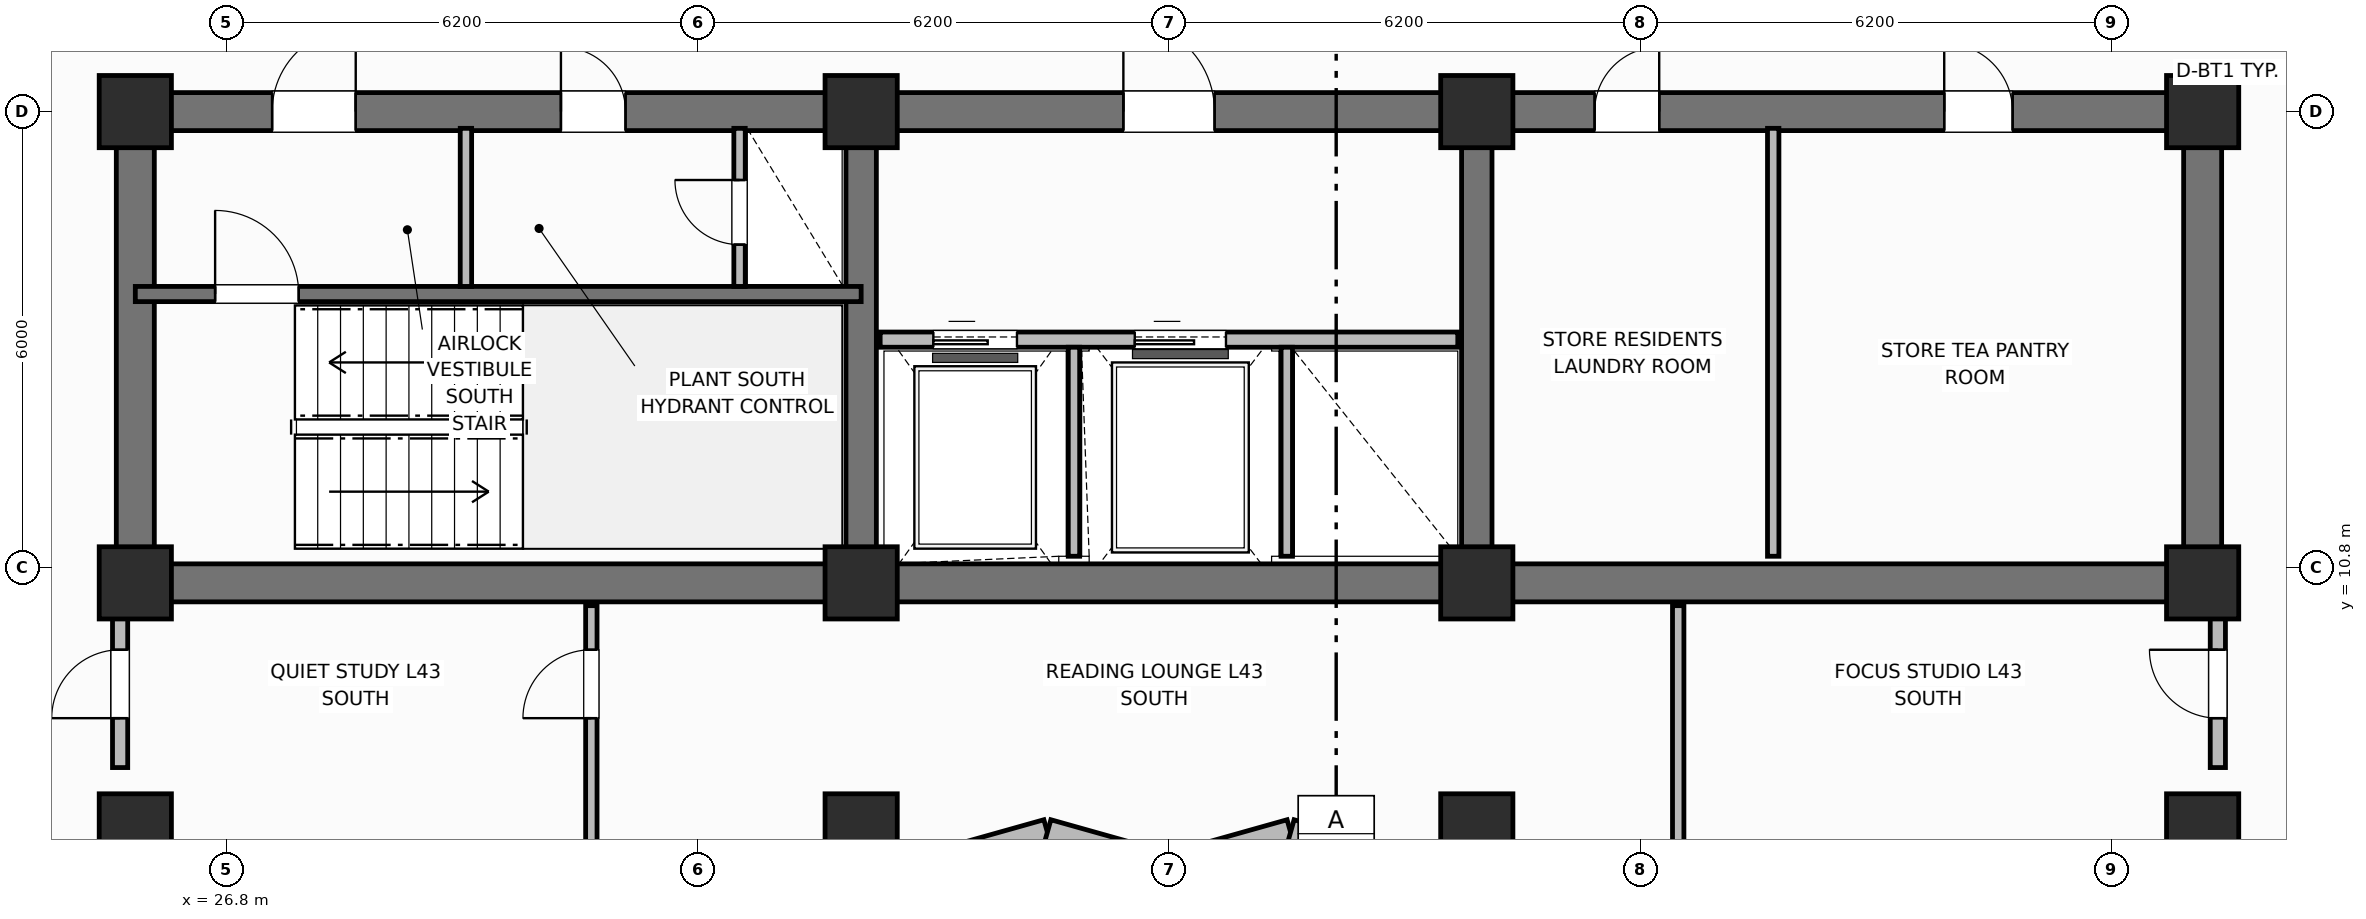
"""IFC4 building model, lengths in metres.
Left out: names, types, materials, properties, quantities, classifications, styles, units other than length and angle.
Written with IfcOpenShell. Run it as: python <this file> out.ifc"""

import sys

from ifc_helpers import new_model, si_unit, direction, frame, frame_2d, origin, origin_2d, place, context, subcontext, project, spatial, rectangle, extrude, element, fill, save


model = new_model("IFC4")
c1 = context("Model", 3, precision=1e-05, world=origin(), true_north=direction((0.0, 1.0)))
c2 = subcontext(c1, "Body", "Model", "MODEL_VIEW")
j1 = project(units=[si_unit("LENGTHUNIT", "METRE"), si_unit("PLANEANGLEUNIT", "RADIAN")], contexts=[c1])
p1 = place(None, origin())
s1 = spatial("IfcSite", under=j1, at=p1, CompositionType="ELEMENT")
p2 = place(p1, origin())
s2 = spatial("IfcBuilding", under=s1, at=p2, CompositionType="ELEMENT")
p3 = place(p2, frame((0.0, 0.0, 173.7)))
s3 = spatial("IfcBuildingStorey", under=s2, at=p3, CompositionType="ELEMENT", Elevation=173.7)
p4 = place(p3, frame((52.8, 10.6, 0.0), z_axis=(0.0, 0.0, 1.0), x_axis=(-1.0, 0.0, 0.0)))
e1 = element("IfcWall", 1, at=p4, inside=s3, PredefinedType="SHEAR", context=c2, shape_type="SweptSolid", body=[
    extrude(rectangle(XDim=27.2, YDim=0.5, at=frame_2d((13.6, 0.0))), origin(), (0.0, 0.0, 1.0), 3.7),
])
for number, where, z_axis, x_axis in (
    (2, (25.6, 10.85, 0.0), (0.0, 0.0, 1.0), (0.0, 1.0, 0.0)),
    (3, (52.8, 10.85, 0.0), (0.0, 0.0, 1.0), (0.0, 1.0, 0.0)),
):
    element("IfcWall", number, at=place(p3, frame(where, z_axis=z_axis, x_axis=x_axis)), inside=s3, PredefinedType="SHEAR", context=c2, shape_type="SweptSolid", body=[
        extrude(rectangle(XDim=5.7, YDim=0.5, at=frame_2d((2.85, 0.0))), origin(), (0.0, 0.0, 1.0), 3.7),
    ])
p5 = place(p3, frame((25.6, 16.8, 0.0), z_axis=(0.0, 0.0, 1.0), x_axis=(1.0, 0.0, 0.0)))
e4 = element("IfcWall", 4, at=p5, inside=s3, PredefinedType="SHEAR", context=c2, shape_type="SweptSolid", body=[
    extrude(rectangle(XDim=27.2, YDim=0.5, at=frame_2d((13.6, 0.0))), origin(), (0.0, 0.0, 1.0), 3.7),
])
p6 = place(p5, frame((1.8, 0.0, 0.0)))
e5 = element("IfcOpeningElement", 5, at=p6, cuts=e4, PredefinedType="OPENING", context=c2, shape_type="SweptSolid", body=[
    extrude(rectangle(XDim=1.1, YDim=2.15, at=frame_2d((0.55, 1.075))), frame((0.0, 0.26, 0.0), z_axis=(0.0, -1.0, 0.0), x_axis=(1.0, 0.0, 0.0)), (0.0, 0.0, 1.0), 0.52),
])
p7 = place(p5, frame((5.6, 0.0, 0.0)))
e6 = element("IfcOpeningElement", 6, at=p7, cuts=e4, PredefinedType="OPENING", context=c2, shape_type="SweptSolid", body=[
    extrude(rectangle(XDim=0.85, YDim=2.1, at=frame_2d((0.425, 1.05))), frame((0.0, 0.26, 0.0), z_axis=(0.0, -1.0, 0.0), x_axis=(1.0, 0.0, 0.0)), (0.0, 0.0, 1.0), 0.52),
])
p8 = place(p5, frame((13.0, 0.0, 0.0)))
e7 = element("IfcOpeningElement", 7, at=p8, cuts=e4, PredefinedType="OPENING", context=c2, shape_type="SweptSolid", body=[
    extrude(rectangle(XDim=1.2, YDim=2.15, at=frame_2d((0.6, 1.075))), frame((0.0, 0.26, 0.0), z_axis=(0.0, -1.0, 0.0), x_axis=(1.0, 0.0, 0.0)), (0.0, 0.0, 1.0), 0.52),
])
p9 = place(p5, frame((19.2, 0.0, 0.0)))
e8 = element("IfcOpeningElement", 8, at=p9, cuts=e4, PredefinedType="OPENING", context=c2, shape_type="SweptSolid", body=[
    extrude(rectangle(XDim=0.85, YDim=2.1, at=frame_2d((0.425, 1.05))), frame((0.0, 0.26, 0.0), z_axis=(0.0, -1.0, 0.0), x_axis=(1.0, 0.0, 0.0)), (0.0, 0.0, 1.0), 0.52),
])
p10 = place(p5, frame((23.8, 0.0, 0.0)))
e9 = element("IfcOpeningElement", 9, at=p10, cuts=e4, PredefinedType="OPENING", context=c2, shape_type="SweptSolid", body=[
    extrude(rectangle(XDim=0.9, YDim=2.1, at=frame_2d((0.45, 1.05))), frame((0.0, 0.26, 0.0), z_axis=(0.0, -1.0, 0.0), x_axis=(1.0, 0.0, 0.0)), (0.0, 0.0, 1.0), 0.52),
])
for number, where, z_axis, x_axis in (
    (10, (35.15, 10.85, 0.0), (0.0, 0.0, 1.0), (0.0, 1.0, 0.0)),
    (11, (43.25, 10.85, 0.0), (0.0, 0.0, 1.0), (0.0, 1.0, 0.0)),
):
    element("IfcWall", number, at=place(p3, frame(where, z_axis=z_axis, x_axis=x_axis)), inside=s3, PredefinedType="SHEAR", context=c2, shape_type="SweptSolid", body=[
        extrude(rectangle(XDim=5.7, YDim=0.4, at=frame_2d((2.85, 0.0))), origin(), (0.0, 0.0, 1.0), 3.7),
    ])
for number, where, z_axis, x_axis in (
    (12, (25.6, 10.6, 0.0), (0.0, 0.0, 1.0), (1.0, 0.0, 0.0)),
    (13, (25.6, 16.8, 0.0), (0.0, 0.0, 1.0), (1.0, 0.0, 0.0)),
    (14, (35.15, 10.6, 0.0), (0.0, 0.0, 1.0), (1.0, 0.0, 0.0)),
    (15, (35.15, 16.8, 0.0), (0.0, 0.0, 1.0), (1.0, 0.0, 0.0)),
    (16, (43.25, 10.6, 0.0), (0.0, 0.0, 1.0), (1.0, 0.0, 0.0)),
    (17, (43.25, 16.8, 0.0), (0.0, 0.0, 1.0), (1.0, 0.0, 0.0)),
    (18, (52.8, 10.6, 0.0), (0.0, 0.0, 1.0), (1.0, 0.0, 0.0)),
    (19, (52.8, 16.8, 0.0), (0.0, 0.0, 1.0), (1.0, 0.0, 0.0)),
    (20, (25.6, 7.35, 0.0), (0.0, 0.0, 1.0), (1.0, 0.0, 0.0)),
    (21, (35.15, 7.35, 0.0), (0.0, 0.0, 1.0), (1.0, 0.0, 0.0)),
    (22, (43.25, 7.35, 0.0), (0.0, 0.0, 1.0), (1.0, 0.0, 0.0)),
    (23, (52.8, 7.35, 0.0), (0.0, 0.0, 1.0), (1.0, 0.0, 0.0)),
):
    element("IfcColumn", number, at=place(p3, frame(where, z_axis=z_axis, x_axis=x_axis)), inside=s3, PredefinedType="COLUMN", context=c2, shape_type="SweptSolid", body=[
        extrude(rectangle(XDim=0.95, YDim=0.95, at=origin_2d()), origin(), (0.0, 0.0, 1.0), 3.7),
    ])
p11 = place(p3, frame((36.0, 6.87, 0.0), z_axis=(0.0, 0.0, 1.0), x_axis=(0.962662902433, 0.270703040766, 0.0)))
e24 = element("IfcWall", 24, at=p11, inside=s3, PredefinedType="SOLIDWALL", context=c2, shape_type="SweptSolid", body=[
    extrude(rectangle(XDim=1.662, YDim=0.34, at=frame_2d((0.831, 0.0))), origin(), (0.0, 0.0, 1.0), 2.72),
])
p12 = place(p3, frame((37.6, 7.32, 0.0), z_axis=(0.0, 0.0, 1.0), x_axis=(0.962652136636, -0.270741322725, 0.0)))
e25 = element("IfcWall", 25, at=p12, inside=s3, PredefinedType="SOLIDWALL", context=c2, shape_type="SweptSolid", body=[
    extrude(rectangle(XDim=1.662, YDim=0.34, at=frame_2d((0.831, 0.0))), origin(), (0.0, 0.0, 1.0), 2.72),
])
p13 = place(p3, frame((39.2, 6.87, 0.0), z_axis=(0.0, 0.0, 1.0), x_axis=(0.962662902433, 0.270703040766, 0.0)))
e26 = element("IfcWall", 26, at=p13, inside=s3, PredefinedType="SOLIDWALL", context=c2, shape_type="SweptSolid", body=[
    extrude(rectangle(XDim=1.662, YDim=0.34, at=frame_2d((0.831, 0.0))), origin(), (0.0, 0.0, 1.0), 2.72),
])
p14 = place(p3, frame((40.8, 7.32, 0.0), z_axis=(0.0, 0.0, 1.0), x_axis=(0.962652136636, -0.270741322725, 0.0)))
e27 = element("IfcWall", 27, at=p14, inside=s3, PredefinedType="SOLIDWALL", context=c2, shape_type="SweptSolid", body=[
    extrude(rectangle(XDim=1.662, YDim=0.34, at=frame_2d((0.831, 0.0))), origin(), (0.0, 0.0, 1.0), 2.72),
])
p15 = place(p3, frame((25.6, 14.4, 0.0), z_axis=(0.0, 0.0, 1.0), x_axis=(1.0, 0.0, 0.0)))
e28 = element("IfcWall", 28, at=p15, inside=s3, PredefinedType="SHEAR", context=c2, shape_type="SweptSolid", body=[
    extrude(rectangle(XDim=9.55, YDim=0.2, at=frame_2d((4.775, 0.0))), origin(), (0.0, 0.0, 1.0), 3.7),
])
p16 = place(p15, frame((1.05, 0.0, 0.0)))
e29 = element("IfcOpeningElement", 29, at=p16, cuts=e28, PredefinedType="OPENING", context=c2, shape_type="SweptSolid", body=[
    extrude(rectangle(XDim=1.1, YDim=2.15, at=frame_2d((0.55, 1.075))), frame((0.0, 0.11, 0.0), z_axis=(0.0, -1.0, 0.0), x_axis=(1.0, 0.0, 0.0)), (0.0, 0.0, 1.0), 0.22),
])
p17 = place(p3, frame((29.95, 14.5, 0.0), z_axis=(0.0, 0.0, 1.0), x_axis=(0.0, 1.0, 0.0)))
e30 = element("IfcWall", 30, at=p17, inside=s3, PredefinedType="PARTITIONING", context=c2, shape_type="SweptSolid", body=[
    extrude(rectangle(XDim=2.08, YDim=0.15, at=frame_2d((1.04, 0.0))), origin(), (0.0, 0.0, 1.0), 2.55),
])
p18 = place(p3, frame((33.55, 14.5, 0.0), z_axis=(0.0, 0.0, 1.0), x_axis=(0.0, 1.0, 0.0)))
e31 = element("IfcWall", 31, at=p18, inside=s3, PredefinedType="PARTITIONING", context=c2, shape_type="SweptSolid", body=[
    extrude(rectangle(XDim=2.08, YDim=0.15, at=frame_2d((1.04, 0.0))), origin(), (0.0, 0.0, 1.0), 2.55),
])
p19 = place(p18, frame((0.55, 0.0, 0.0)))
e32 = element("IfcOpeningElement", 32, at=p19, cuts=e31, PredefinedType="OPENING", context=c2, shape_type="SweptSolid", body=[
    extrude(rectangle(XDim=0.85, YDim=2.05, at=frame_2d((0.425, 1.025))), frame((0.0, 0.085, 0.0), z_axis=(0.0, -1.0, 0.0), x_axis=(1.0, 0.0, 0.0)), (0.0, 0.0, 1.0), 0.17),
])
p20 = place(p3, frame((35.4, 13.8, 0.0), z_axis=(0.0, 0.0, 1.0), x_axis=(1.0, 0.0, 0.0)))
e33 = element("IfcWall", 33, at=p20, inside=s3, PredefinedType="PARTITIONING", context=c2, shape_type="SweptSolid", body=[
    extrude(rectangle(XDim=7.6, YDim=0.2, at=frame_2d((3.8, 0.0))), origin(), (0.0, 0.0, 1.0), 2.32),
])
p21 = place(p20, frame((0.7, 0.0, 0.0)))
e34 = element("IfcOpeningElement", 34, at=p21, cuts=e33, PredefinedType="OPENING", context=c2, shape_type="SweptSolid", body=[
    extrude(rectangle(XDim=1.1, YDim=2.15, at=frame_2d((0.55, 1.075))), frame((0.0, 0.11, 0.0), z_axis=(0.0, -1.0, 0.0), x_axis=(1.0, 0.0, 0.0)), (0.0, 0.0, 1.0), 0.22),
])
p22 = place(p20, frame((3.35, 0.0, 0.0)))
e35 = element("IfcOpeningElement", 35, at=p22, cuts=e33, PredefinedType="OPENING", context=c2, shape_type="SweptSolid", body=[
    extrude(rectangle(XDim=1.2, YDim=2.15, at=frame_2d((0.6, 1.075))), frame((0.0, 0.11, 0.0), z_axis=(0.0, -1.0, 0.0), x_axis=(1.0, 0.0, 0.0)), (0.0, 0.0, 1.0), 0.22),
])
for number, where, z_axis, x_axis in (
    (36, (37.95, 10.95, 0.0), (0.0, 0.0, 1.0), (0.0, 1.0, 0.0)),
    (37, (40.75, 10.95, 0.0), (0.0, 0.0, 1.0), (0.0, 1.0, 0.0)),
):
    element("IfcWall", number, at=place(p3, frame(where, z_axis=z_axis, x_axis=x_axis)), inside=s3, PredefinedType="PARTITIONING", context=c2, shape_type="SweptSolid", body=[
        extrude(rectangle(XDim=2.75, YDim=0.15, at=frame_2d((1.375, 0.0))), origin(), (0.0, 0.0, 1.0), 2.55),
    ])
p23 = place(p3, frame((47.15, 10.95, 0.0), z_axis=(0.0, 0.0, 1.0), x_axis=(0.0, 1.0, 0.0)))
e38 = element("IfcWall", 38, at=p23, inside=s3, PredefinedType="PARTITIONING", context=c2, shape_type="SweptSolid", body=[
    extrude(rectangle(XDim=5.63, YDim=0.15, at=frame_2d((2.815, 0.0))), origin(), (0.0, 0.0, 1.0), 2.55),
])
p24 = place(p3, frame((31.6, 6.87, 0.0), z_axis=(0.0, 0.0, 1.0), x_axis=(0.0, 1.0, 0.0)))
e39 = element("IfcWall", 39, at=p24, inside=s3, PredefinedType="PARTITIONING", context=c2, shape_type="SweptSolid", body=[
    extrude(rectangle(XDim=3.43, YDim=0.15, at=frame_2d((1.715, 0.0))), origin(), (0.0, 0.0, 1.0), 2.55),
])
p25 = place(p24, frame((1.95, 0.0, 0.0)))
e40 = element("IfcOpeningElement", 40, at=p25, cuts=e39, PredefinedType="OPENING", context=c2, shape_type="SweptSolid", body=[
    extrude(rectangle(XDim=0.9, YDim=2.1, at=frame_2d((0.45, 1.05))), frame((0.0, 0.085, 0.0), z_axis=(0.0, -1.0, 0.0), x_axis=(1.0, 0.0, 0.0)), (0.0, 0.0, 1.0), 0.17),
])
p26 = place(p3, frame((45.9, 6.87, 0.0), z_axis=(0.0, 0.0, 1.0), x_axis=(0.0, 1.0, 0.0)))
e41 = element("IfcWall", 41, at=p26, inside=s3, PredefinedType="PARTITIONING", context=c2, shape_type="SweptSolid", body=[
    extrude(rectangle(XDim=3.43, YDim=0.15, at=frame_2d((1.715, 0.0))), origin(), (0.0, 0.0, 1.0), 2.55),
])
p27 = place(p3, frame((25.4, 8.17, 0.0), z_axis=(0.0, 0.0, 1.0), x_axis=(0.0, 1.0, 0.0)))
e42 = element("IfcWall", 42, at=p27, inside=s3, PredefinedType="PARTITIONING", context=c2, shape_type="SweptSolid", body=[
    extrude(rectangle(XDim=2.13, YDim=0.2, at=frame_2d((1.065, 0.0))), origin(), (0.0, 0.0, 1.0), 2.55),
])
p28 = place(p27, frame((0.65, 0.0, 0.0)))
e43 = element("IfcOpeningElement", 43, at=p28, cuts=e42, PredefinedType="OPENING", context=c2, shape_type="SweptSolid", body=[
    extrude(rectangle(XDim=0.9, YDim=2.1, at=frame_2d((0.45, 1.05))), frame((0.0, 0.11, 0.0), z_axis=(0.0, -1.0, 0.0), x_axis=(1.0, 0.0, 0.0)), (0.0, 0.0, 1.0), 0.22),
])
p29 = place(p3, frame((53.0, 8.17, 0.0), z_axis=(0.0, 0.0, 1.0), x_axis=(0.0, 1.0, 0.0)))
e44 = element("IfcWall", 44, at=p29, inside=s3, PredefinedType="PARTITIONING", context=c2, shape_type="SweptSolid", body=[
    extrude(rectangle(XDim=2.13, YDim=0.2, at=frame_2d((1.065, 0.0))), origin(), (0.0, 0.0, 1.0), 2.55),
])
p30 = place(p29, frame((0.65, 0.0, 0.0)))
e45 = element("IfcOpeningElement", 45, at=p30, cuts=e44, PredefinedType="OPENING", context=c2, shape_type="SweptSolid", body=[
    extrude(rectangle(XDim=0.9, YDim=2.1, at=frame_2d((0.45, 1.05))), frame((0.0, 0.11, 0.0), z_axis=(0.0, -1.0, 0.0), x_axis=(1.0, 0.0, 0.0)), (0.0, 0.0, 1.0), 0.22),
])
p31 = place(p16, origin())
e46 = element("IfcDoor", 46, at=p31, inside=s3, OperationType="SINGLE_SWING_LEFT", PredefinedType="DOOR", context=c2, shape_type="SweptSolid", body=[
    extrude(rectangle(XDim=1.1, YDim=2.15, at=frame_2d((0.55, 1.075))), frame((0.0, 0.025, 0.0), z_axis=(0.0, -1.0, 0.0), x_axis=(1.0, 0.0, 0.0)), (0.0, 0.0, 1.0), 0.05),
])
fill(e29, e46)
p32 = place(p19, origin())
e47 = element("IfcDoor", 47, at=p32, inside=s3, OperationType="SINGLE_SWING_RIGHT", PredefinedType="TRAPDOOR", context=c2, shape_type="SweptSolid", body=[
    extrude(rectangle(XDim=0.85, YDim=2.05, at=frame_2d((0.425, 1.025))), frame((0.0, 0.025, 0.0), z_axis=(0.0, -1.0, 0.0), x_axis=(1.0, 0.0, 0.0)), (0.0, 0.0, 1.0), 0.05),
])
fill(e32, e47)
p33 = place(p21, origin())
e48 = element("IfcDoor", 48, at=p33, inside=s3, OperationType="SLIDING_TO_LEFT", PredefinedType="DOOR", context=c2, shape_type="SweptSolid", body=[
    extrude(rectangle(XDim=1.1, YDim=2.15, at=frame_2d((0.55, 1.075))), frame((0.0, 0.025, 0.0), z_axis=(0.0, -1.0, 0.0), x_axis=(1.0, 0.0, 0.0)), (0.0, 0.0, 1.0), 0.05),
])
fill(e34, e48)
p34 = place(p22, origin())
e49 = element("IfcDoor", 49, at=p34, inside=s3, OperationType="SLIDING_TO_LEFT", PredefinedType="DOOR", context=c2, shape_type="SweptSolid", body=[
    extrude(rectangle(XDim=1.2, YDim=2.15, at=frame_2d((0.6, 1.075))), frame((0.0, 0.025, 0.0), z_axis=(0.0, -1.0, 0.0), x_axis=(1.0, 0.0, 0.0)), (0.0, 0.0, 1.0), 0.05),
])
fill(e35, e49)
p35 = place(p25, origin())
e50 = element("IfcDoor", 50, at=p35, inside=s3, OperationType="SINGLE_SWING_LEFT", PredefinedType="DOOR", context=c2, shape_type="SweptSolid", body=[
    extrude(rectangle(XDim=0.9, YDim=2.1, at=frame_2d((0.45, 1.05))), frame((0.0, 0.025, 0.0), z_axis=(0.0, -1.0, 0.0), x_axis=(1.0, 0.0, 0.0)), (0.0, 0.0, 1.0), 0.05),
])
fill(e40, e50)
p36 = place(p28, origin())
e51 = element("IfcDoor", 51, at=p36, inside=s3, OperationType="SINGLE_SWING_LEFT", PredefinedType="DOOR", context=c2, shape_type="SweptSolid", body=[
    extrude(rectangle(XDim=0.9, YDim=2.1, at=frame_2d((0.45, 1.05))), frame((0.0, 0.025, 0.0), z_axis=(0.0, -1.0, 0.0), x_axis=(1.0, 0.0, 0.0)), (0.0, 0.0, 1.0), 0.05),
])
fill(e43, e51)
p37 = place(p30, origin())
e52 = element("IfcDoor", 52, at=p37, inside=s3, OperationType="SINGLE_SWING_RIGHT", PredefinedType="DOOR", context=c2, shape_type="SweptSolid", body=[
    extrude(rectangle(XDim=0.9, YDim=2.1, at=frame_2d((0.45, 1.05))), frame((0.0, 0.025, 0.0), z_axis=(0.0, -1.0, 0.0), x_axis=(1.0, 0.0, 0.0)), (0.0, 0.0, 1.0), 0.05),
])
fill(e45, e52)
p38 = place(p6, origin())
e53 = element("IfcDoor", 53, at=p38, inside=s3, OperationType="SINGLE_SWING_RIGHT", PredefinedType="DOOR", context=c2, shape_type="SweptSolid", body=[
    extrude(rectangle(XDim=1.1, YDim=2.15, at=frame_2d((0.55, 1.075))), frame((0.0, 0.025, 0.0), z_axis=(0.0, -1.0, 0.0), x_axis=(1.0, 0.0, 0.0)), (0.0, 0.0, 1.0), 0.05),
])
fill(e5, e53)
p39 = place(p7, origin())
e54 = element("IfcDoor", 54, at=p39, inside=s3, OperationType="SINGLE_SWING_LEFT", PredefinedType="DOOR", context=c2, shape_type="SweptSolid", body=[
    extrude(rectangle(XDim=0.85, YDim=2.1, at=frame_2d((0.425, 1.05))), frame((0.0, 0.025, 0.0), z_axis=(0.0, -1.0, 0.0), x_axis=(1.0, 0.0, 0.0)), (0.0, 0.0, 1.0), 0.05),
])
fill(e6, e54)
p40 = place(p8, origin())
e55 = element("IfcDoor", 55, at=p40, inside=s3, OperationType="SINGLE_SWING_LEFT", PredefinedType="DOOR", context=c2, shape_type="SweptSolid", body=[
    extrude(rectangle(XDim=1.2, YDim=2.15, at=frame_2d((0.6, 1.075))), frame((0.0, 0.025, 0.0), z_axis=(0.0, -1.0, 0.0), x_axis=(1.0, 0.0, 0.0)), (0.0, 0.0, 1.0), 0.05),
])
fill(e7, e55)
p41 = place(p9, origin())
e56 = element("IfcDoor", 56, at=p41, inside=s3, OperationType="SINGLE_SWING_RIGHT", PredefinedType="DOOR", context=c2, shape_type="SweptSolid", body=[
    extrude(rectangle(XDim=0.85, YDim=2.1, at=frame_2d((0.425, 1.05))), frame((0.0, 0.025, 0.0), z_axis=(0.0, -1.0, 0.0), x_axis=(1.0, 0.0, 0.0)), (0.0, 0.0, 1.0), 0.05),
])
fill(e8, e56)
p42 = place(p10, origin())
e57 = element("IfcDoor", 57, at=p42, inside=s3, OperationType="SINGLE_SWING_LEFT", PredefinedType="DOOR", context=c2, shape_type="SweptSolid", body=[
    extrude(rectangle(XDim=0.9, YDim=2.1, at=frame_2d((0.45, 1.05))), frame((0.0, 0.025, 0.0), z_axis=(0.0, -1.0, 0.0), x_axis=(1.0, 0.0, 0.0)), (0.0, 0.0, 1.0), 0.05),
])
fill(e9, e57)
save(model, sys.argv[1])
